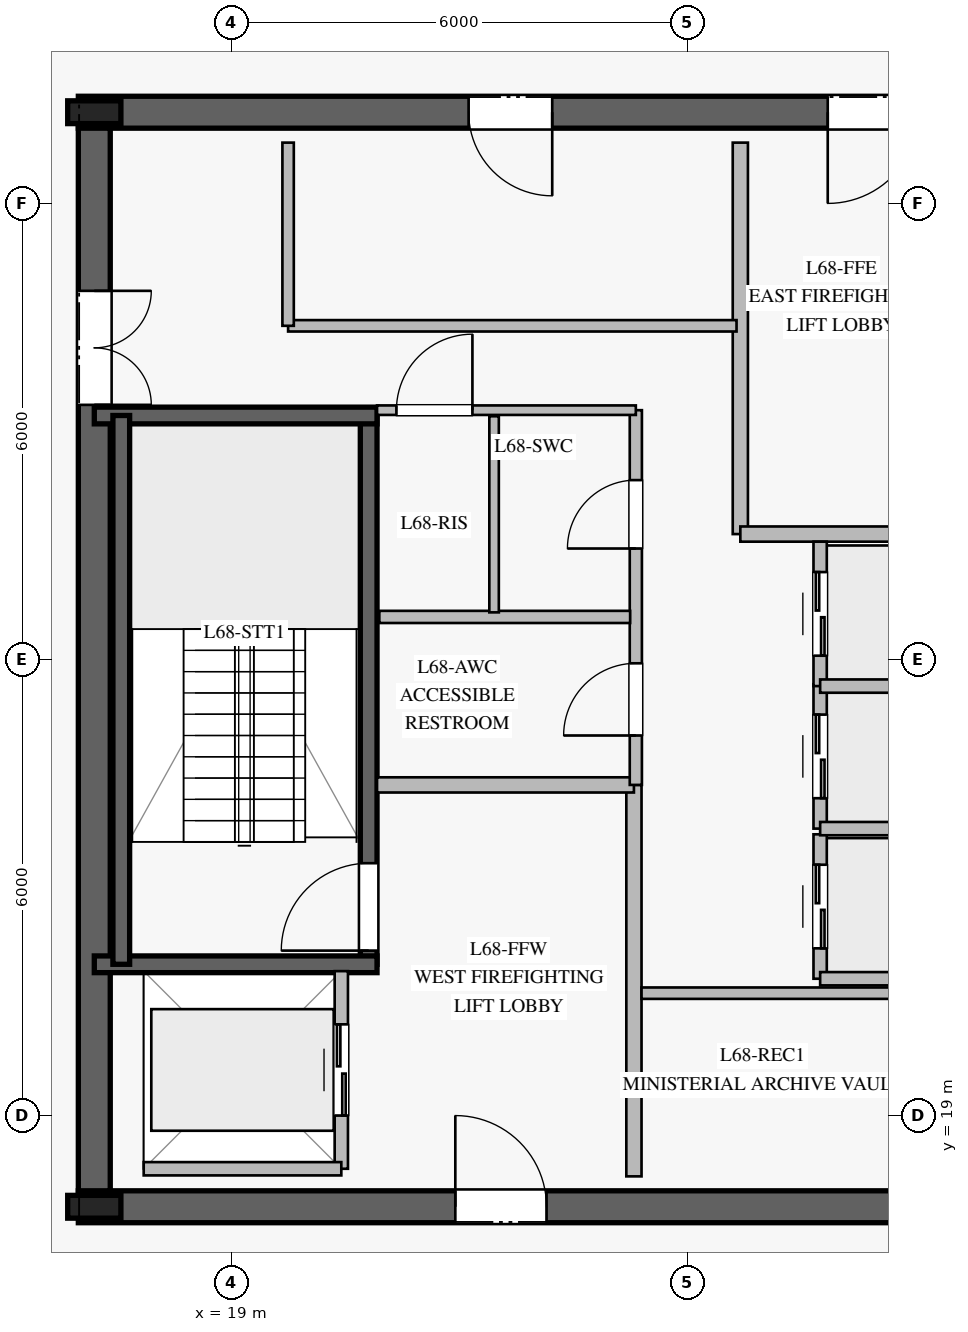
"""IFC4 building model, lengths in metres.
Left out: names, types, materials, properties, quantities, classifications, styles, units other than length and angle.
Written with IfcOpenShell. Run it as: python <this file> out.ifc"""

import sys

from ifc_helpers import new_model, si_unit, direction, frame, frame_2d, origin, origin_2d, place, context, subcontext, project, spatial, rectangle, i_section, extrude, element, fill, save


model = new_model("IFC4")
c1 = context("Model", 3, precision=1e-05, world=origin(), true_north=direction((0.0, 1.0)))
c2 = subcontext(c1, "Body", "Model", "MODEL_VIEW")
j1 = project(units=[si_unit("LENGTHUNIT", "METRE"), si_unit("PLANEANGLEUNIT", "RADIAN")], contexts=[c1])
p1 = place(None, origin())
s1 = spatial("IfcSite", under=j1, at=p1, CompositionType="ELEMENT")
p2 = place(p1, origin())
s2 = spatial("IfcBuilding", under=s1, at=p2, CompositionType="ELEMENT")
p3 = place(p2, frame((0.0, 0.0, 282.2)))
s3 = spatial("IfcBuildingStorey", under=s2, at=p3, CompositionType="ELEMENT", Elevation=282.2)
p4 = place(p3, frame((16.99, 17.8, 0.0), z_axis=(0.0, 0.0, 1.0), x_axis=(1.0, 0.0, 0.0)))
e1 = element("IfcWall", 1, at=p4, inside=s3, PredefinedType="SHEAR", context=c2, shape_type="SweptSolid", body=[
    extrude(rectangle(XDim=16.02, YDim=0.42, at=frame_2d((8.01, 0.0))), origin(), (0.0, 0.0, 1.0), 3.78),
])
p5 = place(p4, frame((4.96, 0.0, 0.0)))
e2 = element("IfcOpeningElement", 2, at=p5, cuts=e1, PredefinedType="OPENING", context=c2, shape_type="SweptSolid", body=[
    extrude(rectangle(XDim=1.2, YDim=2.25, at=frame_2d((0.6, 1.125))), frame((0.0, 0.22, 0.0), z_axis=(0.0, -1.0, 0.0), x_axis=(1.0, 0.0, 0.0)), (0.0, 0.0, 1.0), 0.44),
])
p6 = place(p4, frame((10.86, 0.0, 0.0)))
e3 = element("IfcOpeningElement", 3, at=p6, cuts=e1, PredefinedType="OPENING", context=c2, shape_type="SweptSolid", body=[
    extrude(rectangle(XDim=1.1, YDim=2.2, at=frame_2d((0.55, 1.1))), frame((0.0, 0.22, 0.0), z_axis=(0.0, -1.0, 0.0), x_axis=(1.0, 0.0, 0.0)), (0.0, 0.0, 1.0), 0.44),
])
p7 = place(p3, frame((33.01, 32.2, 0.0), z_axis=(0.0, 0.0, 1.0), x_axis=(-1.0, 0.0, 0.0)))
e4 = element("IfcWall", 4, at=p7, inside=s3, PredefinedType="SHEAR", context=c2, shape_type="SweptSolid", body=[
    extrude(rectangle(XDim=16.02, YDim=0.42, at=frame_2d((8.01, 0.0))), origin(), (0.0, 0.0, 1.0), 3.78),
])
p8 = place(p7, frame((4.96, 0.0, 0.0)))
e5 = element("IfcOpeningElement", 5, at=p8, cuts=e4, PredefinedType="OPENING", context=c2, shape_type="SweptSolid", body=[
    extrude(rectangle(XDim=1.2, YDim=2.25, at=frame_2d((0.6, 1.125))), frame((0.0, 0.22, 0.0), z_axis=(0.0, -1.0, 0.0), x_axis=(1.0, 0.0, 0.0)), (0.0, 0.0, 1.0), 0.44),
])
p9 = place(p7, frame((9.785, 0.0, 0.0)))
e6 = element("IfcOpeningElement", 6, at=p9, cuts=e4, PredefinedType="OPENING", context=c2, shape_type="SweptSolid", body=[
    extrude(rectangle(XDim=1.1, YDim=2.2, at=frame_2d((0.55, 1.1))), frame((0.0, 0.22, 0.0), z_axis=(0.0, -1.0, 0.0), x_axis=(1.0, 0.0, 0.0)), (0.0, 0.0, 1.0), 0.44),
])
p10 = place(p3, frame((17.2, 31.99, 0.0), z_axis=(0.0, 0.0, 1.0), x_axis=(0.0, -1.0, 0.0)))
e7 = element("IfcWall", 7, at=p10, inside=s3, PredefinedType="SHEAR", context=c2, shape_type="SweptSolid", body=[
    extrude(rectangle(XDim=13.98, YDim=0.42, at=frame_2d((6.99, 0.0))), origin(), (0.0, 0.0, 1.0), 3.78),
])
p11 = place(p10, frame((2.14, 0.0, 0.0)))
e8 = element("IfcOpeningElement", 8, at=p11, cuts=e7, PredefinedType="OPENING", context=c2, shape_type="SweptSolid", body=[
    extrude(rectangle(XDim=1.5, YDim=2.2, at=frame_2d((0.75, 1.1))), frame((0.0, 0.22, 0.0), z_axis=(0.0, -1.0, 0.0), x_axis=(1.0, 0.0, 0.0)), (0.0, 0.0, 1.0), 0.44),
])
for number, where, z_axis, x_axis in (
    (9, (17.2, 17.8, 0.0), (0.0, 0.0, 1.0), (1.0, 0.0, 0.0)),
    (10, (17.2, 32.2, 0.0), (0.0, 0.0, 1.0), (1.0, 0.0, 0.0)),
):
    element("IfcColumn", number, at=place(p3, frame(where, z_axis=z_axis, x_axis=x_axis)), inside=s3, PredefinedType="COLUMN", context=c2, shape_type="SweptSolid", body=[
        extrude(i_section(OverallWidth=0.3, OverallDepth=0.7, WebThickness=0.017, FlangeThickness=0.032, at=origin_2d()), origin(), (0.0, 0.0, 1.0), 4.0),
    ])
p12 = place(p3, frame((20.81, 20.99, 0.0), z_axis=(0.0, 0.0, 1.0), x_axis=(0.0, 1.0, 0.0)))
e11 = element("IfcWall", 11, at=p12, inside=s3, PredefinedType="SOLIDWALL", context=c2, shape_type="SweptSolid", body=[
    extrude(rectangle(XDim=7.22, YDim=0.22, at=frame_2d((3.61, 0.0))), origin(), (0.0, 0.0, 1.0), 3.78),
])
p13 = place(p12, frame((0.18, 0.0, 0.0)))
e12 = element("IfcOpeningElement", 12, at=p13, cuts=e11, PredefinedType="OPENING", context=c2, shape_type="SweptSolid", body=[
    extrude(rectangle(XDim=1.15, YDim=2.2, at=frame_2d((0.575, 1.1))), frame((0.0, 0.12, 0.0), z_axis=(0.0, -1.0, 0.0), x_axis=(1.0, 0.0, 0.0)), (0.0, 0.0, 1.0), 0.24),
])
for number, where, z_axis, x_axis in (
    (13, (17.2, 20.99, 0.0), (0.0, 0.0, 1.0), (1.0, 0.0, 0.0)),
    (14, (17.2, 28.21, 0.0), (0.0, 0.0, 1.0), (1.0, 0.0, 0.0)),
):
    element("IfcWall", number, at=place(p3, frame(where, z_axis=z_axis, x_axis=x_axis)), inside=s3, PredefinedType="SOLIDWALL", context=c2, shape_type="SweptSolid", body=[
        extrude(rectangle(XDim=3.72, YDim=0.22, at=frame_2d((1.86, 0.0))), origin(), (0.0, 0.0, 1.0), 3.78),
    ])
p14 = place(p3, frame((17.555, 28.21, 0.0), z_axis=(0.0, 0.0, 1.0), x_axis=(0.0, -1.0, 0.0)))
e15 = element("IfcWall", 15, at=p14, inside=s3, PredefinedType="SOLIDWALL", context=c2, shape_type="SweptSolid", body=[
    extrude(rectangle(XDim=7.22, YDim=0.22, at=frame_2d((3.61, 0.0))), origin(), (0.0, 0.0, 1.0), 3.78),
])
p15 = place(p3, frame((24.3, 18.2, 0.0), z_axis=(0.0, 0.0, 1.0), x_axis=(0.0, 1.0, 0.0)))
e16 = element("IfcWall", 16, at=p15, inside=s3, PredefinedType="PARTITIONING", context=c2, shape_type="SweptSolid", body=[
    extrude(rectangle(XDim=5.15, YDim=0.2, at=frame_2d((2.575, 0.0))), origin(), (0.0, 0.0, 1.0), 3.78),
])
p16 = place(p3, frame((20.92, 23.35, 0.0), z_axis=(0.0, 0.0, 1.0), x_axis=(1.0, 0.0, 0.0)))
e17 = element("IfcWall", 17, at=p16, inside=s3, PredefinedType="PARTITIONING", context=c2, shape_type="SweptSolid", body=[
    extrude(rectangle(XDim=3.38, YDim=0.2, at=frame_2d((1.69, 0.0))), origin(), (0.0, 0.0, 1.0), 3.78),
])
p17 = place(p3, frame((25.7, 26.65, 0.0), z_axis=(0.0, 0.0, 1.0), x_axis=(0.0, 1.0, 0.0)))
e18 = element("IfcWall", 18, at=p17, inside=s3, PredefinedType="PARTITIONING", context=c2, shape_type="SweptSolid", body=[
    extrude(rectangle(XDim=5.15, YDim=0.2, at=frame_2d((2.575, 0.0))), origin(), (0.0, 0.0, 1.0), 3.78),
])
p18 = place(p3, frame((25.7, 26.65, 0.0), z_axis=(0.0, 0.0, 1.0), x_axis=(1.0, 0.0, 0.0)))
e19 = element("IfcWall", 19, at=p18, inside=s3, PredefinedType="PARTITIONING", context=c2, shape_type="SweptSolid", body=[
    extrude(rectangle(XDim=3.38, YDim=0.2, at=frame_2d((1.69, 0.0))), origin(), (0.0, 0.0, 1.0), 3.78),
])
p19 = place(p3, frame((24.325, 23.35, 0.0), z_axis=(0.0, 0.0, 1.0), x_axis=(0.0, 1.0, 0.0)))
e20 = element("IfcWall", 20, at=p19, inside=s3, PredefinedType="PLUMBINGWALL", context=c2, shape_type="SweptSolid", body=[
    extrude(rectangle(XDim=4.93, YDim=0.16, at=frame_2d((2.465, 0.0))), origin(), (0.0, 0.0, 1.0), 3.78),
])
p20 = place(p19, frame((0.65, 0.0, 0.0)))
e21 = element("IfcOpeningElement", 21, at=p20, cuts=e20, PredefinedType="OPENING", context=c2, shape_type="SweptSolid", body=[
    extrude(rectangle(XDim=0.95, YDim=2.1, at=frame_2d((0.475, 1.05))), frame((0.0, 0.09, 0.0), z_axis=(0.0, -1.0, 0.0), x_axis=(1.0, 0.0, 0.0)), (0.0, 0.0, 1.0), 0.18),
])
p21 = place(p19, frame((3.11, 0.0, 0.0)))
e22 = element("IfcOpeningElement", 22, at=p21, cuts=e20, PredefinedType="OPENING", context=c2, shape_type="SweptSolid", body=[
    extrude(rectangle(XDim=0.9, YDim=2.1, at=frame_2d((0.45, 1.05))), frame((0.0, 0.09, 0.0), z_axis=(0.0, -1.0, 0.0), x_axis=(1.0, 0.0, 0.0)), (0.0, 0.0, 1.0), 0.18),
])
p22 = place(p3, frame((20.92, 28.28, 0.0), z_axis=(0.0, 0.0, 1.0), x_axis=(1.0, 0.0, 0.0)))
e23 = element("IfcWall", 23, at=p22, inside=s3, PredefinedType="PARTITIONING", context=c2, shape_type="SweptSolid", body=[
    extrude(rectangle(XDim=3.405, YDim=0.125, at=frame_2d((1.703, 0.0))), origin(), (0.0, 0.0, 1.0), 3.78),
])
p23 = place(p22, frame((0.255, 0.0, 0.0)))
e24 = element("IfcOpeningElement", 24, at=p23, cuts=e23, PredefinedType="OPENING", context=c2, shape_type="SweptSolid", body=[
    extrude(rectangle(XDim=1.0, YDim=2.15, at=frame_2d((0.5, 1.075))), frame((0.0, 0.073, 0.0), z_axis=(0.0, -1.0, 0.0), x_axis=(1.0, 0.0, 0.0)), (0.0, 0.0, 1.0), 0.145),
])
p24 = place(p3, frame((20.95, 25.56, 0.0), z_axis=(0.0, 0.0, 1.0), x_axis=(1.0, 0.0, 0.0)))
e25 = element("IfcWall", 25, at=p24, inside=s3, PredefinedType="PLUMBINGWALL", context=c2, shape_type="SweptSolid", body=[
    extrude(rectangle(XDim=3.3, YDim=0.16, at=frame_2d((1.65, 0.0))), origin(), (0.0, 0.0, 1.0), 3.78),
])
p25 = place(p3, frame((22.46, 25.62, 0.0), z_axis=(0.0, 0.0, 1.0), x_axis=(0.0, 1.0, 0.0)))
e26 = element("IfcWall", 26, at=p25, inside=s3, PredefinedType="PARTITIONING", context=c2, shape_type="SweptSolid", body=[
    extrude(rectangle(XDim=2.58, YDim=0.125, at=frame_2d((1.29, 0.0))), origin(), (0.0, 0.0, 1.0), 3.78),
])
p26 = place(p3, frame((24.4, 20.61, 0.0), z_axis=(0.0, 0.0, 1.0), x_axis=(1.0, 0.0, 0.0)))
e27 = element("IfcWall", 27, at=p26, inside=s3, PredefinedType="PARTITIONING", context=c2, shape_type="SweptSolid", body=[
    extrude(rectangle(XDim=5.9, YDim=0.15, at=frame_2d((2.95, 0.0))), origin(), (0.0, 0.0, 1.0), 3.78),
])
p27 = place(p3, frame((19.75, 29.39, 0.0), z_axis=(0.0, 0.0, 1.0), x_axis=(1.0, 0.0, 0.0)))
e28 = element("IfcWall", 28, at=p27, inside=s3, PredefinedType="PARTITIONING", context=c2, shape_type="SweptSolid", body=[
    extrude(rectangle(XDim=5.9, YDim=0.15, at=frame_2d((2.95, 0.0))), origin(), (0.0, 0.0, 1.0), 3.78),
])
p28 = place(p3, frame((19.75, 29.39, 0.0), z_axis=(0.0, 0.0, 1.0), x_axis=(0.0, 1.0, 0.0)))
e29 = element("IfcWall", 29, at=p28, inside=s3, PredefinedType="PARTITIONING", context=c2, shape_type="SweptSolid", body=[
    extrude(rectangle(XDim=2.41, YDim=0.15, at=frame_2d((1.205, 0.0))), origin(), (0.0, 0.0, 1.0), 3.78),
])
p29 = place(p3, frame((26.75, 20.8, 0.0), z_axis=(0.0, 0.0, 1.0), x_axis=(0.0, 1.0, 0.0)))
e30 = element("IfcWall", 30, at=p29, inside=s3, PredefinedType="PARTITIONING", context=c2, shape_type="SweptSolid", body=[
    extrude(rectangle(XDim=1.9, YDim=0.175, at=frame_2d((0.95, 0.0))), origin(), (0.0, 0.0, 1.0), 3.78),
])
p30 = place(p29, frame((0.4, 0.0, 0.0)))
e31 = element("IfcOpeningElement", 31, at=p30, cuts=e30, PredefinedType="OPENING", context=c2, shape_type="SweptSolid", body=[
    extrude(rectangle(XDim=1.1, YDim=2.2, at=frame_2d((0.55, 1.1))), frame((0.0, 0.098, 0.0), z_axis=(0.0, -1.0, 0.0), x_axis=(1.0, 0.0, 0.0)), (0.0, 0.0, 1.0), 0.195),
])
p31 = place(p3, frame((26.75, 20.8, 0.0), z_axis=(0.0, 0.0, 1.0), x_axis=(1.0, 0.0, 0.0)))
e32 = element("IfcWall", 32, at=p31, inside=s3, PredefinedType="PARTITIONING", context=c2, shape_type="SweptSolid", body=[
    extrude(rectangle(XDim=2.35, YDim=0.175, at=frame_2d((1.175, 0.0))), origin(), (0.0, 0.0, 1.0), 3.78),
])
p32 = place(p3, frame((26.75, 22.775, 0.0), z_axis=(0.0, 0.0, 1.0), x_axis=(0.0, 1.0, 0.0)))
e33 = element("IfcWall", 33, at=p32, inside=s3, PredefinedType="PARTITIONING", context=c2, shape_type="SweptSolid", body=[
    extrude(rectangle(XDim=1.9, YDim=0.175, at=frame_2d((0.95, 0.0))), origin(), (0.0, 0.0, 1.0), 3.78),
])
p33 = place(p32, frame((0.4, 0.0, 0.0)))
e34 = element("IfcOpeningElement", 34, at=p33, cuts=e33, PredefinedType="OPENING", context=c2, shape_type="SweptSolid", body=[
    extrude(rectangle(XDim=1.1, YDim=2.2, at=frame_2d((0.55, 1.1))), frame((0.0, 0.098, 0.0), z_axis=(0.0, -1.0, 0.0), x_axis=(1.0, 0.0, 0.0)), (0.0, 0.0, 1.0), 0.195),
])
p34 = place(p3, frame((26.75, 22.775, 0.0), z_axis=(0.0, 0.0, 1.0), x_axis=(1.0, 0.0, 0.0)))
e35 = element("IfcWall", 35, at=p34, inside=s3, PredefinedType="PARTITIONING", context=c2, shape_type="SweptSolid", body=[
    extrude(rectangle(XDim=2.35, YDim=0.175, at=frame_2d((1.175, 0.0))), origin(), (0.0, 0.0, 1.0), 3.78),
])
p35 = place(p3, frame((26.75, 24.65, 0.0), z_axis=(0.0, 0.0, 1.0), x_axis=(0.0, 1.0, 0.0)))
e36 = element("IfcWall", 36, at=p35, inside=s3, PredefinedType="PARTITIONING", context=c2, shape_type="SweptSolid", body=[
    extrude(rectangle(XDim=1.9, YDim=0.175, at=frame_2d((0.95, 0.0))), origin(), (0.0, 0.0, 1.0), 3.78),
])
p36 = place(p35, frame((0.4, 0.0, 0.0)))
e37 = element("IfcOpeningElement", 37, at=p36, cuts=e36, PredefinedType="OPENING", context=c2, shape_type="SweptSolid", body=[
    extrude(rectangle(XDim=1.1, YDim=2.2, at=frame_2d((0.55, 1.1))), frame((0.0, 0.098, 0.0), z_axis=(0.0, -1.0, 0.0), x_axis=(1.0, 0.0, 0.0)), (0.0, 0.0, 1.0), 0.195),
])
p37 = place(p3, frame((26.75, 24.65, 0.0), z_axis=(0.0, 0.0, 1.0), x_axis=(1.0, 0.0, 0.0)))
e38 = element("IfcWall", 38, at=p37, inside=s3, PredefinedType="PARTITIONING", context=c2, shape_type="SweptSolid", body=[
    extrude(rectangle(XDim=2.35, YDim=0.175, at=frame_2d((1.175, 0.0))), origin(), (0.0, 0.0, 1.0), 3.78),
])
p38 = place(p3, frame((20.45, 18.3, 0.0), z_axis=(0.0, 0.0, 1.0), x_axis=(0.0, 1.0, 0.0)))
e39 = element("IfcWall", 39, at=p38, inside=s3, PredefinedType="PARTITIONING", context=c2, shape_type="SweptSolid", body=[
    extrude(rectangle(XDim=2.6, YDim=0.175, at=frame_2d((1.3, 0.0))), origin(), (0.0, 0.0, 1.0), 3.78),
])
p39 = place(p38, frame((0.7, 0.0, 0.0)))
e40 = element("IfcOpeningElement", 40, at=p39, cuts=e39, PredefinedType="OPENING", context=c2, shape_type="SweptSolid", body=[
    extrude(rectangle(XDim=1.2, YDim=2.2, at=frame_2d((0.6, 1.1))), frame((0.0, 0.098, 0.0), z_axis=(0.0, -1.0, 0.0), x_axis=(1.0, 0.0, 0.0)), (0.0, 0.0, 1.0), 0.195),
])
p40 = place(p3, frame((17.85, 18.3, 0.0), z_axis=(0.0, 0.0, 1.0), x_axis=(1.0, 0.0, 0.0)))
e41 = element("IfcWall", 41, at=p40, inside=s3, PredefinedType="PARTITIONING", context=c2, shape_type="SweptSolid", body=[
    extrude(rectangle(XDim=2.6, YDim=0.175, at=frame_2d((1.3, 0.0))), origin(), (0.0, 0.0, 1.0), 3.78),
])
p41 = place(p13, origin())
e42 = element("IfcDoor", 42, at=p41, inside=s3, OperationType="SINGLE_SWING_LEFT", PredefinedType="DOOR", context=c2, shape_type="SweptSolid", body=[
    extrude(rectangle(XDim=1.15, YDim=2.2, at=frame_2d((0.575, 1.1))), frame((0.0, 0.025, 0.0), z_axis=(0.0, -1.0, 0.0), x_axis=(1.0, 0.0, 0.0)), (0.0, 0.0, 1.0), 0.05),
])
fill(e12, e42)
p42 = place(p5, origin())
e43 = element("IfcDoor", 43, at=p42, inside=s3, OperationType="SINGLE_SWING_LEFT", PredefinedType="DOOR", context=c2, shape_type="SweptSolid", body=[
    extrude(rectangle(XDim=1.2, YDim=2.25, at=frame_2d((0.6, 1.125))), frame((0.0, 0.025, 0.0), z_axis=(0.0, -1.0, 0.0), x_axis=(1.0, 0.0, 0.0)), (0.0, 0.0, 1.0), 0.05),
])
fill(e2, e43)
p43 = place(p8, origin())
e44 = element("IfcDoor", 44, at=p43, inside=s3, OperationType="SINGLE_SWING_RIGHT", PredefinedType="DOOR", context=c2, shape_type="SweptSolid", body=[
    extrude(rectangle(XDim=1.2, YDim=2.25, at=frame_2d((0.6, 1.125))), frame((0.0, 0.025, 0.0), z_axis=(0.0, -1.0, 0.0), x_axis=(1.0, 0.0, 0.0)), (0.0, 0.0, 1.0), 0.05),
])
fill(e5, e44)
p44 = place(p11, origin())
e45 = element("IfcDoor", 45, at=p44, inside=s3, OperationType="DOUBLE_DOOR_SINGLE_SWING", PredefinedType="DOOR", context=c2, shape_type="SweptSolid", body=[
    extrude(rectangle(XDim=1.5, YDim=2.2, at=frame_2d((0.75, 1.1))), frame((0.0, 0.025, 0.0), z_axis=(0.0, -1.0, 0.0), x_axis=(1.0, 0.0, 0.0)), (0.0, 0.0, 1.0), 0.05),
])
fill(e8, e45)
p45 = place(p20, origin())
e46 = element("IfcDoor", 46, at=p45, inside=s3, OperationType="SINGLE_SWING_LEFT", PredefinedType="DOOR", context=c2, shape_type="SweptSolid", body=[
    extrude(rectangle(XDim=0.95, YDim=2.1, at=frame_2d((0.475, 1.05))), frame((0.0, 0.025, 0.0), z_axis=(0.0, -1.0, 0.0), x_axis=(1.0, 0.0, 0.0)), (0.0, 0.0, 1.0), 0.05),
])
fill(e21, e46)
p46 = place(p23, origin())
e47 = element("IfcDoor", 47, at=p46, inside=s3, OperationType="SINGLE_SWING_RIGHT", PredefinedType="DOOR", context=c2, shape_type="SweptSolid", body=[
    extrude(rectangle(XDim=1.0, YDim=2.15, at=frame_2d((0.5, 1.075))), frame((0.0, 0.025, 0.0), z_axis=(0.0, -1.0, 0.0), x_axis=(1.0, 0.0, 0.0)), (0.0, 0.0, 1.0), 0.05),
])
fill(e24, e47)
p47 = place(p21, origin())
e48 = element("IfcDoor", 48, at=p47, inside=s3, OperationType="SINGLE_SWING_LEFT", PredefinedType="DOOR", context=c2, shape_type="SweptSolid", body=[
    extrude(rectangle(XDim=0.9, YDim=2.1, at=frame_2d((0.45, 1.05))), frame((0.0, 0.025, 0.0), z_axis=(0.0, -1.0, 0.0), x_axis=(1.0, 0.0, 0.0)), (0.0, 0.0, 1.0), 0.05),
])
fill(e22, e48)
p48 = place(p9, origin())
e49 = element("IfcDoor", 49, at=p48, inside=s3, OperationType="SINGLE_SWING_LEFT", PredefinedType="DOOR", context=c2, shape_type="SweptSolid", body=[
    extrude(rectangle(XDim=1.1, YDim=2.2, at=frame_2d((0.55, 1.1))), frame((0.0, 0.025, 0.0), z_axis=(0.0, -1.0, 0.0), x_axis=(1.0, 0.0, 0.0)), (0.0, 0.0, 1.0), 0.05),
])
fill(e6, e49)
p49 = place(p30, origin())
e50 = element("IfcDoor", 50, at=p49, inside=s3, OperationType="DOUBLE_DOOR_SLIDING", PredefinedType="DOOR", context=c2, shape_type="SweptSolid", body=[
    extrude(rectangle(XDim=1.1, YDim=2.2, at=frame_2d((0.55, 1.1))), frame((0.0, 0.025, 0.0), z_axis=(0.0, -1.0, 0.0), x_axis=(1.0, 0.0, 0.0)), (0.0, 0.0, 1.0), 0.05),
])
fill(e31, e50)
p50 = place(p33, origin())
e51 = element("IfcDoor", 51, at=p50, inside=s3, OperationType="DOUBLE_DOOR_SLIDING", PredefinedType="DOOR", context=c2, shape_type="SweptSolid", body=[
    extrude(rectangle(XDim=1.1, YDim=2.2, at=frame_2d((0.55, 1.1))), frame((0.0, 0.025, 0.0), z_axis=(0.0, -1.0, 0.0), x_axis=(1.0, 0.0, 0.0)), (0.0, 0.0, 1.0), 0.05),
])
fill(e34, e51)
p51 = place(p36, origin())
e52 = element("IfcDoor", 52, at=p51, inside=s3, OperationType="DOUBLE_DOOR_SLIDING", PredefinedType="DOOR", context=c2, shape_type="SweptSolid", body=[
    extrude(rectangle(XDim=1.1, YDim=2.2, at=frame_2d((0.55, 1.1))), frame((0.0, 0.025, 0.0), z_axis=(0.0, -1.0, 0.0), x_axis=(1.0, 0.0, 0.0)), (0.0, 0.0, 1.0), 0.05),
])
fill(e37, e52)
p52 = place(p39, origin())
e53 = element("IfcDoor", 53, at=p52, inside=s3, OperationType="DOUBLE_DOOR_SLIDING", PredefinedType="DOOR", context=c2, shape_type="SweptSolid", body=[
    extrude(rectangle(XDim=1.2, YDim=2.2, at=frame_2d((0.6, 1.1))), frame((0.0, 0.025, 0.0), z_axis=(0.0, -1.0, 0.0), x_axis=(1.0, 0.0, 0.0)), (0.0, 0.0, 1.0), 0.05),
])
fill(e40, e53)
save(model, sys.argv[1])
